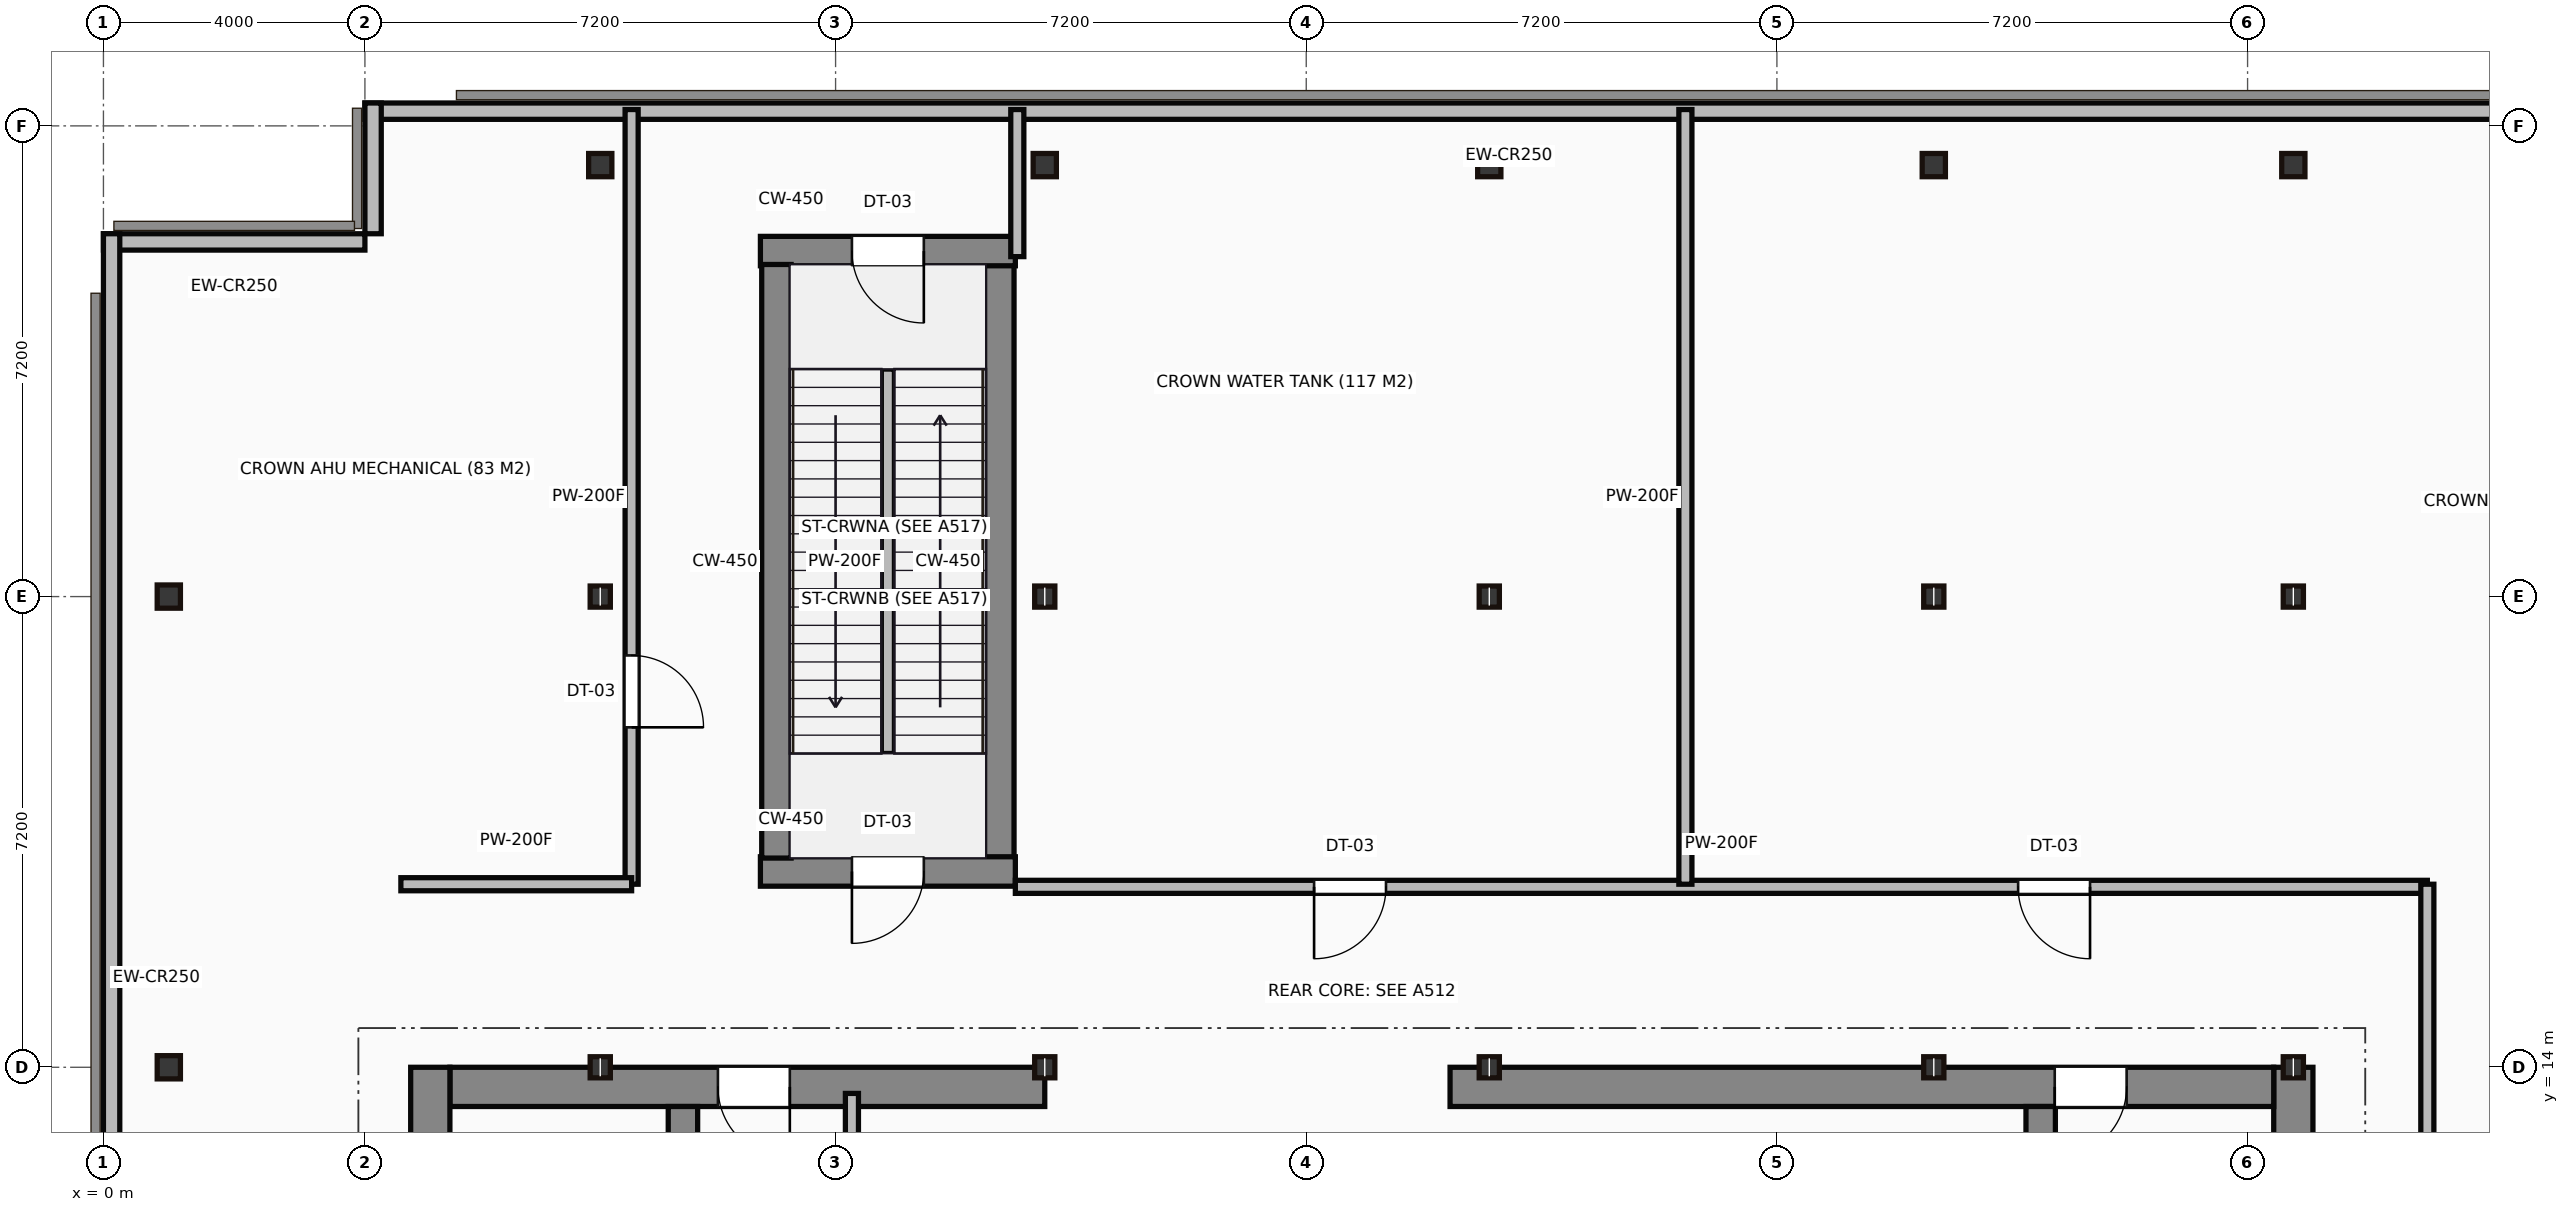
"""IFC4 building model, lengths in metres.
Left out: names, types, materials, properties, quantities, classifications, styles, units other than length and angle.
Written with IfcOpenShell. Run it as: python <this file> out.ifc"""

import sys

from ifc_helpers import new_model, si_unit, direction, frame, frame_2d, origin, origin_2d, place, context, subcontext, project, spatial, rectangle, hollow_rectangle, i_section, extrude, source, transform, mapped, element, fill, save


model = new_model("IFC4")
c1 = context("Model", 3, precision=1e-05, world=origin(), true_north=direction((0.0, 1.0)))
c2 = subcontext(c1, "Body", "Model", "MODEL_VIEW")
j1 = project(units=[si_unit("LENGTHUNIT", "METRE"), si_unit("PLANEANGLEUNIT", "RADIAN")], contexts=[c1])
p1 = place(None, origin())
s1 = spatial("IfcSite", under=j1, at=p1, CompositionType="ELEMENT")
p2 = place(p1, origin())
s2 = spatial("IfcBuilding", under=s1, at=p2, CompositionType="ELEMENT")
p3 = place(p2, frame((0.0, 0.0, 299.85)))
s3 = spatial("IfcBuildingStorey", under=s2, at=p3, CompositionType="ELEMENT", Elevation=299.85)
m1 = source(origin(), c2, "Body", "SweptSolid", [
    extrude(rectangle(XDim=13.1, YDim=0.6, at=frame_2d((6.55, 0.0))), origin(), (0.0, 0.0, 1.0), 3.8),
])
for number, where, z_axis, x_axis in (
    (1, (5.0, 0.9, 0.0), (0.0, 0.0, 1.0), (0.0, 1.0, 0.0)),
    (2, (33.5, 0.9, 0.0), (0.0, 0.0, 1.0), (0.0, 1.0, 0.0)),
):
    element("IfcWall", number, at=place(p3, frame(where, z_axis=z_axis, x_axis=x_axis)), inside=s3, PredefinedType="SHEAR", context=c2, shape_type="MappedRepresentation", body=[
        mapped(m1, transform((0.0, 0.0, 0.0))),
    ])
m2 = source(origin(), c2, "Body", "SweptSolid", [
    extrude(rectangle(XDim=9.1, YDim=0.6, at=frame_2d((4.55, 0.0))), origin(), (0.0, 0.0, 1.0), 3.8),
])
p4 = place(p3, frame((5.3, 13.7, 0.0), z_axis=(0.0, 0.0, 1.0), x_axis=(1.0, 0.0, 0.0)))
e3 = element("IfcWall", 3, at=p4, inside=s3, PredefinedType="SHEAR", context=c2, shape_type="MappedRepresentation", body=[
    mapped(m2, transform((0.0, 0.0, 0.0))),
])
p5 = place(p4, frame((4.1, 0.0, 0.0)))
e4 = element("IfcOpeningElement", 4, at=p5, cuts=e3, PredefinedType="OPENING", context=c2, shape_type="SweptSolid", body=[
    extrude(rectangle(XDim=1.1, YDim=2.15, at=frame_2d((0.55, 1.075))), frame((0.0, 0.31, 0.0), z_axis=(0.0, -1.0, 0.0), x_axis=(1.0, 0.0, 0.0)), (0.0, 0.0, 1.0), 0.62),
])
m3 = source(origin(), c2, "Body", "SweptSolid", [
    extrude(rectangle(XDim=12.6, YDim=0.6, at=frame_2d((6.3, 0.0))), origin(), (0.0, 0.0, 1.0), 3.8),
])
p6 = place(p3, frame((20.6, 13.7, 0.0), z_axis=(0.0, 0.0, 1.0), x_axis=(1.0, 0.0, 0.0)))
e5 = element("IfcWall", 5, at=p6, inside=s3, PredefinedType="SHEAR", context=c2, shape_type="MappedRepresentation", body=[
    mapped(m3, transform((0.0, 0.0, 0.0))),
])
p7 = place(p6, frame((9.25, 0.0, 0.0)))
e6 = element("IfcOpeningElement", 6, at=p7, cuts=e5, PredefinedType="OPENING", context=c2, shape_type="SweptSolid", body=[
    extrude(rectangle(XDim=1.1, YDim=2.15, at=frame_2d((0.55, 1.075))), frame((0.0, 0.31, 0.0), z_axis=(0.0, -1.0, 0.0), x_axis=(1.0, 0.0, 0.0)), (0.0, 0.0, 1.0), 0.62),
])
m4 = source(origin(), c2, "Body", "SweptSolid", [
    extrude(rectangle(XDim=12.5, YDim=0.45, at=frame_2d((6.25, 0.0))), origin(), (0.0, 0.0, 1.0), 3.8),
])
for number, where, z_axis, x_axis in (
    (7, (8.865, 0.9, 0.0), (0.0, 0.0, 1.0), (0.0, 1.0, 0.0)),
    (8, (29.635, 0.9, 0.0), (0.0, 0.0, 1.0), (0.0, 1.0, 0.0)),
):
    element("IfcWall", number, at=place(p3, frame(where, z_axis=z_axis, x_axis=x_axis)), inside=s3, PredefinedType="SHEAR", context=c2, shape_type="MappedRepresentation", body=[
        mapped(m4, transform((0.0, 0.0, 0.0))),
    ])
m5 = source(origin(), c2, "Body", "SweptSolid", [
    extrude(hollow_rectangle(XDim=0.356, YDim=0.356, WallThickness=0.019, at=origin_2d()), origin(), (0.0, 0.0, 1.0), 3.8),
])
for number, where, z_axis, x_axis in (
    (9, (1.0, 14.0, 0.0), (0.0, 0.0, 1.0), (1.0, 0.0, 0.0)),
    (10, (1.0, 21.2, 0.0), (0.0, 0.0, 1.0), (1.0, 0.0, 0.0)),
):
    element("IfcColumn", number, at=place(p3, frame(where, z_axis=z_axis, x_axis=x_axis)), inside=s3, PredefinedType="COLUMN", context=c2, shape_type="MappedRepresentation", body=[
        mapped(m5, transform((0.0, 0.0, 0.0))),
    ])
m6 = source(origin(), c2, "Body", "SweptSolid", [
    extrude(i_section(OverallWidth=0.309, OverallDepth=0.323, WebThickness=0.014, FlangeThickness=0.023, at=origin_2d()), origin(), (0.0, 0.0, 1.0), 3.8),
])
for number, where, z_axis, x_axis in (
    (11, (7.6, 14.0, 0.0), (0.0, 0.0, 1.0), (1.0, 0.0, 0.0)),
    (12, (7.6, 21.2, 0.0), (0.0, 0.0, 1.0), (1.0, 0.0, 0.0)),
):
    element("IfcColumn", number, at=place(p3, frame(where, z_axis=z_axis, x_axis=x_axis)), inside=s3, PredefinedType="COLUMN", context=c2, shape_type="MappedRepresentation", body=[
        mapped(m6, transform((0.0, 0.0, 0.0))),
    ])
p8 = place(p3, frame((7.6, 27.8, 0.0), z_axis=(0.0, 0.0, 1.0), x_axis=(1.0, 0.0, 0.0)))
e13 = element("IfcColumn", 13, at=p8, inside=s3, PredefinedType="COLUMN", context=c2, shape_type="MappedRepresentation", body=[
    mapped(m5, transform((0.0, 0.0, 0.0))),
])
for number, where, z_axis, x_axis in (
    (14, (14.4, 14.0, 0.0), (0.0, 0.0, 1.0), (1.0, 0.0, 0.0)),
    (15, (14.4, 21.2, 0.0), (0.0, 0.0, 1.0), (1.0, 0.0, 0.0)),
):
    element("IfcColumn", number, at=place(p3, frame(where, z_axis=z_axis, x_axis=x_axis)), inside=s3, PredefinedType="COLUMN", context=c2, shape_type="MappedRepresentation", body=[
        mapped(m6, transform((0.0, 0.0, 0.0))),
    ])
p9 = place(p3, frame((14.4, 27.8, 0.0), z_axis=(0.0, 0.0, 1.0), x_axis=(1.0, 0.0, 0.0)))
e16 = element("IfcColumn", 16, at=p9, inside=s3, PredefinedType="COLUMN", context=c2, shape_type="MappedRepresentation", body=[
    mapped(m5, transform((0.0, 0.0, 0.0))),
])
for number, where, z_axis, x_axis in (
    (17, (21.2, 14.0, 0.0), (0.0, 0.0, 1.0), (1.0, 0.0, 0.0)),
    (18, (21.2, 21.2, 0.0), (0.0, 0.0, 1.0), (1.0, 0.0, 0.0)),
):
    element("IfcColumn", number, at=place(p3, frame(where, z_axis=z_axis, x_axis=x_axis)), inside=s3, PredefinedType="COLUMN", context=c2, shape_type="MappedRepresentation", body=[
        mapped(m6, transform((0.0, 0.0, 0.0))),
    ])
p10 = place(p3, frame((21.2, 27.8, 0.0), z_axis=(0.0, 0.0, 1.0), x_axis=(1.0, 0.0, 0.0)))
e19 = element("IfcColumn", 19, at=p10, inside=s3, PredefinedType="COLUMN", context=c2, shape_type="MappedRepresentation", body=[
    mapped(m5, transform((0.0, 0.0, 0.0))),
])
for number, where, z_axis, x_axis in (
    (20, (28.0, 14.0, 0.0), (0.0, 0.0, 1.0), (1.0, 0.0, 0.0)),
    (21, (28.0, 21.2, 0.0), (0.0, 0.0, 1.0), (1.0, 0.0, 0.0)),
):
    element("IfcColumn", number, at=place(p3, frame(where, z_axis=z_axis, x_axis=x_axis)), inside=s3, PredefinedType="COLUMN", context=c2, shape_type="MappedRepresentation", body=[
        mapped(m6, transform((0.0, 0.0, 0.0))),
    ])
p11 = place(p3, frame((28.0, 27.8, 0.0), z_axis=(0.0, 0.0, 1.0), x_axis=(1.0, 0.0, 0.0)))
e22 = element("IfcColumn", 22, at=p11, inside=s3, PredefinedType="COLUMN", context=c2, shape_type="MappedRepresentation", body=[
    mapped(m5, transform((0.0, 0.0, 0.0))),
])
for number, where, z_axis, x_axis in (
    (23, (33.5, 14.0, 0.0), (0.0, 0.0, 1.0), (1.0, 0.0, 0.0)),
    (24, (33.5, 21.2, 0.0), (0.0, 0.0, 1.0), (1.0, 0.0, 0.0)),
):
    element("IfcColumn", number, at=place(p3, frame(where, z_axis=z_axis, x_axis=x_axis)), inside=s3, PredefinedType="COLUMN", context=c2, shape_type="MappedRepresentation", body=[
        mapped(m6, transform((0.0, 0.0, 0.0))),
    ])
p12 = place(p3, frame((33.5, 27.8, 0.0), z_axis=(0.0, 0.0, 1.0), x_axis=(1.0, 0.0, 0.0)))
e25 = element("IfcColumn", 25, at=p12, inside=s3, PredefinedType="COLUMN", context=c2, shape_type="MappedRepresentation", body=[
    mapped(m5, transform((0.0, 0.0, 0.0))),
])
m7 = source(origin(), c2, "Body", "SweptSolid", [
    extrude(rectangle(XDim=35.0, YDim=0.25, at=frame_2d((17.5, 0.0))), origin(), (0.0, 0.0, 1.0), 3.5),
])
p13 = place(p3, frame((39.0, 28.625, 0.0), z_axis=(0.0, 0.0, 1.0), x_axis=(-1.0, 0.0, 0.0)))
e26 = element("IfcWall", 26, at=p13, inside=s3, PredefinedType="STANDARD", context=c2, shape_type="MappedRepresentation", body=[
    mapped(m7, transform((0.0, 0.0, 0.0))),
])
m8 = source(origin(), c2, "Body", "SweptSolid", [
    extrude(rectangle(XDim=2.0, YDim=0.25, at=frame_2d((1.0, 0.0))), origin(), (0.0, 0.0, 1.0), 3.5),
])
p14 = place(p3, frame((4.125, 28.75, 0.0), z_axis=(0.0, 0.0, 1.0), x_axis=(0.0, -1.0, 0.0)))
e27 = element("IfcWall", 27, at=p14, inside=s3, PredefinedType="STANDARD", context=c2, shape_type="MappedRepresentation", body=[
    mapped(m8, transform((0.0, 0.0, 0.0))),
])
m9 = source(origin(), c2, "Body", "SweptSolid", [
    extrude(rectangle(XDim=4.0, YDim=0.25, at=frame_2d((2.0, 0.0))), origin(), (0.0, 0.0, 1.0), 3.5),
])
p15 = place(p3, frame((4.0, 26.625, 0.0), z_axis=(0.0, 0.0, 1.0), x_axis=(-1.0, 0.0, 0.0)))
e28 = element("IfcWall", 28, at=p15, inside=s3, PredefinedType="STANDARD", context=c2, shape_type="MappedRepresentation", body=[
    mapped(m9, transform((0.0, 0.0, 0.0))),
])
m10 = source(origin(), c2, "Body", "SweptSolid", [
    extrude(rectangle(XDim=22.75, YDim=0.25, at=frame_2d((11.375, 0.0))), origin(), (0.0, 0.0, 1.0), 3.5),
])
p16 = place(p3, frame((0.125, 26.75, 0.0), z_axis=(0.0, 0.0, 1.0), x_axis=(0.0, -1.0, 0.0)))
e29 = element("IfcWall", 29, at=p16, inside=s3, PredefinedType="STANDARD", context=c2, shape_type="MappedRepresentation", body=[
    mapped(m10, transform((0.0, 0.0, 0.0))),
])
m11 = source(origin(), c2, "Body", "SweptSolid", [
    extrude(rectangle(XDim=3.9, YDim=0.45, at=frame_2d((1.95, 0.0))), origin(), (0.0, 0.0, 1.0), 3.8),
])
p17 = place(p3, frame((10.05, 16.995, 0.0), z_axis=(0.0, 0.0, 1.0), x_axis=(1.0, 0.0, 0.0)))
e30 = element("IfcWall", 30, at=p17, inside=s3, PredefinedType="SHEAR", context=c2, shape_type="MappedRepresentation", body=[
    mapped(m11, transform((0.0, 0.0, 0.0))),
])
p18 = place(p17, frame((1.4, 0.0, 0.0)))
e31 = element("IfcOpeningElement", 31, at=p18, cuts=e30, PredefinedType="OPENING", context=c2, shape_type="SweptSolid", body=[
    extrude(rectangle(XDim=1.1, YDim=2.15, at=frame_2d((0.55, 1.075))), frame((0.0, 0.235, 0.0), z_axis=(0.0, -1.0, 0.0), x_axis=(1.0, 0.0, 0.0)), (0.0, 0.0, 1.0), 0.47),
])
m12 = source(origin(), c2, "Body", "SweptSolid", [
    extrude(rectangle(XDim=9.08, YDim=0.45, at=frame_2d((4.54, 0.0))), origin(), (0.0, 0.0, 1.0), 3.8),
])
for number, where, z_axis, x_axis in (
    (32, (10.295, 17.2, 0.0), (0.0, 0.0, 1.0), (0.0, 1.0, 0.0)),
    (33, (13.705, 17.2, 0.0), (0.0, 0.0, 1.0), (0.0, 1.0, 0.0)),
):
    element("IfcWall", number, at=place(p3, frame(where, z_axis=z_axis, x_axis=x_axis)), inside=s3, PredefinedType="SHEAR", context=c2, shape_type="MappedRepresentation", body=[
        mapped(m12, transform((0.0, 0.0, 0.0))),
    ])
p19 = place(p3, frame((10.05, 26.485, 0.0), z_axis=(0.0, 0.0, 1.0), x_axis=(1.0, 0.0, 0.0)))
e34 = element("IfcWall", 34, at=p19, inside=s3, PredefinedType="SHEAR", context=c2, shape_type="MappedRepresentation", body=[
    mapped(m11, transform((0.0, 0.0, 0.0))),
])
p20 = place(p19, frame((1.4, 0.0, 0.0)))
e35 = element("IfcOpeningElement", 35, at=p20, cuts=e34, PredefinedType="OPENING", context=c2, shape_type="SweptSolid", body=[
    extrude(rectangle(XDim=1.1, YDim=2.15, at=frame_2d((0.55, 1.075))), frame((0.0, 0.235, 0.0), z_axis=(0.0, -1.0, 0.0), x_axis=(1.0, 0.0, 0.0)), (0.0, 0.0, 1.0), 0.47),
])
m13 = source(origin(), c2, "Body", "SweptSolid", [
    extrude(rectangle(XDim=5.88, YDim=0.2, at=frame_2d((2.94, 0.0))), origin(), (0.0, 0.0, 1.0), 3.08),
])
p21 = place(p3, frame((12.0, 18.8, 0.0), z_axis=(0.0, 0.0, 1.0), x_axis=(0.0, 1.0, 0.0)))
e36 = element("IfcWall", 36, at=p21, inside=s3, PredefinedType="PARTITIONING", context=c2, shape_type="MappedRepresentation", body=[
    mapped(m13, transform((0.0, 0.0, 0.0))),
])
m14 = source(origin(), c2, "Body", "SweptSolid", [
    extrude(rectangle(XDim=3.18, YDim=0.2, at=frame_2d((1.59, 0.0))), origin(), (0.0, 0.0, 1.0), 3.5),
])
p22 = place(p3, frame((11.45, 10.42, 0.0), z_axis=(0.0, 0.0, 1.0), x_axis=(0.0, 1.0, 0.0)))
e37 = element("IfcWall", 37, at=p22, inside=s3, PredefinedType="PARTITIONING", context=c2, shape_type="MappedRepresentation", body=[
    mapped(m14, transform((0.0, 0.0, 0.0))),
])
m15 = source(origin(), c2, "Body", "SweptSolid", [
    extrude(rectangle(XDim=11.85, YDim=0.2, at=frame_2d((5.925, 0.0))), origin(), (0.0, 0.0, 1.0), 3.5),
])
p23 = place(p3, frame((8.08, 16.8, 0.0), z_axis=(0.0, 0.0, 1.0), x_axis=(0.0, 1.0, 0.0)))
e38 = element("IfcWall", 38, at=p23, inside=s3, PredefinedType="PARTITIONING", context=c2, shape_type="MappedRepresentation", body=[
    mapped(m15, transform((0.0, 0.0, 0.0))),
])
p24 = place(p23, frame((2.4, 0.0, 0.0)))
e39 = element("IfcOpeningElement", 39, at=p24, cuts=e38, PredefinedType="OPENING", context=c2, shape_type="SweptSolid", body=[
    extrude(rectangle(XDim=1.1, YDim=2.15, at=frame_2d((0.55, 1.075))), frame((0.0, 0.11, 0.0), z_axis=(0.0, -1.0, 0.0), x_axis=(1.0, 0.0, 0.0)), (0.0, 0.0, 1.0), 0.22),
])
m16 = source(origin(), c2, "Body", "SweptSolid", [
    extrude(rectangle(XDim=3.53, YDim=0.2, at=frame_2d((1.765, 0.0))), origin(), (0.0, 0.0, 1.0), 3.5),
])
p25 = place(p3, frame((4.55, 16.8, 0.0), z_axis=(0.0, 0.0, 1.0), x_axis=(1.0, 0.0, 0.0)))
e40 = element("IfcWall", 40, at=p25, inside=s3, PredefinedType="PARTITIONING", context=c2, shape_type="MappedRepresentation", body=[
    mapped(m16, transform((0.0, 0.0, 0.0))),
])
m17 = source(origin(), c2, "Body", "SweptSolid", [
    extrude(rectangle(XDim=21.6, YDim=0.2, at=frame_2d((10.8, 0.0))), origin(), (0.0, 0.0, 1.0), 3.5),
])
p26 = place(p3, frame((13.95, 16.76, 0.0), z_axis=(0.0, 0.0, 1.0), x_axis=(1.0, 0.0, 0.0)))
e41 = element("IfcWall", 41, at=p26, inside=s3, PredefinedType="PARTITIONING", context=c2, shape_type="MappedRepresentation", body=[
    mapped(m17, transform((0.0, 0.0, 0.0))),
])
p27 = place(p26, frame((4.57, 0.0, 0.0)))
e42 = element("IfcOpeningElement", 42, at=p27, cuts=e41, PredefinedType="OPENING", context=c2, shape_type="SweptSolid", body=[
    extrude(rectangle(XDim=1.1, YDim=2.15, at=frame_2d((0.55, 1.075))), frame((0.0, 0.11, 0.0), z_axis=(0.0, -1.0, 0.0), x_axis=(1.0, 0.0, 0.0)), (0.0, 0.0, 1.0), 0.22),
])
p28 = place(p26, frame((15.34, 0.0, 0.0)))
e43 = element("IfcOpeningElement", 43, at=p28, cuts=e41, PredefinedType="OPENING", context=c2, shape_type="SweptSolid", body=[
    extrude(rectangle(XDim=1.1, YDim=2.15, at=frame_2d((0.55, 1.075))), frame((0.0, 0.11, 0.0), z_axis=(0.0, -1.0, 0.0), x_axis=(1.0, 0.0, 0.0)), (0.0, 0.0, 1.0), 0.22),
])
m18 = source(origin(), c2, "Body", "SweptSolid", [
    extrude(rectangle(XDim=11.25, YDim=0.2, at=frame_2d((5.625, 0.0))), origin(), (0.0, 0.0, 1.0), 3.5),
])
p29 = place(p3, frame((35.55, 5.55, 0.0), z_axis=(0.0, 0.0, 1.0), x_axis=(0.0, 1.0, 0.0)))
e44 = element("IfcWall", 44, at=p29, inside=s3, PredefinedType="PARTITIONING", context=c2, shape_type="MappedRepresentation", body=[
    mapped(m18, transform((0.0, 0.0, 0.0))),
])
m19 = source(origin(), c2, "Body", "SweptSolid", [
    extrude(rectangle(XDim=2.25, YDim=0.2, at=frame_2d((1.125, 0.0))), origin(), (0.0, 0.0, 1.0), 3.5),
])
p30 = place(p3, frame((13.98, 26.4, 0.0), z_axis=(0.0, 0.0, 1.0), x_axis=(0.0, 1.0, 0.0)))
e45 = element("IfcWall", 45, at=p30, inside=s3, PredefinedType="PARTITIONING", context=c2, shape_type="MappedRepresentation", body=[
    mapped(m19, transform((0.0, 0.0, 0.0))),
])
p31 = place(p3, frame((24.2, 16.8, 0.0), z_axis=(0.0, 0.0, 1.0), x_axis=(0.0, 1.0, 0.0)))
e46 = element("IfcWall", 46, at=p31, inside=s3, PredefinedType="PARTITIONING", context=c2, shape_type="MappedRepresentation", body=[
    mapped(m15, transform((0.0, 0.0, 0.0))),
])
m20 = source(origin(), c2, "Body", "SweptSolid", [
    extrude(rectangle(XDim=1.1, YDim=2.15, at=frame_2d((0.55, 1.075))), frame((0.0, 0.025, 0.0), z_axis=(0.0, -1.0, 0.0), x_axis=(1.0, 0.0, 0.0)), (0.0, 0.0, 1.0), 0.05),
])
p32 = place(p5, origin())
e47 = element("IfcDoor", 47, at=p32, inside=s3, OperationType="SINGLE_SWING_RIGHT", PredefinedType="DOOR", context=c2, shape_type="MappedRepresentation", body=[
    mapped(m20, transform((0.0, 0.0, 0.0))),
])
fill(e4, e47)
p33 = place(p7, origin())
e48 = element("IfcDoor", 48, at=p33, inside=s3, OperationType="SINGLE_SWING_LEFT", PredefinedType="DOOR", context=c2, shape_type="MappedRepresentation", body=[
    mapped(m20, transform((0.0, 0.0, 0.0))),
])
fill(e6, e48)
p34 = place(p24, frame((1.1, 0.0, 0.0), z_axis=(0.0, 0.0, 1.0), x_axis=(-1.0, 0.0, 0.0)))
e49 = element("IfcDoor", 49, at=p34, inside=s3, OperationType="SINGLE_SWING_LEFT", PredefinedType="DOOR", context=c2, shape_type="MappedRepresentation", body=[
    mapped(m20, transform((0.0, 0.0, 0.0))),
])
fill(e39, e49)
p35 = place(p27, origin())
e50 = element("IfcDoor", 50, at=p35, inside=s3, OperationType="SINGLE_SWING_LEFT", PredefinedType="DOOR", context=c2, shape_type="MappedRepresentation", body=[
    mapped(m20, transform((0.0, 0.0, 0.0))),
])
fill(e42, e50)
p36 = place(p28, origin())
e51 = element("IfcDoor", 51, at=p36, inside=s3, OperationType="SINGLE_SWING_RIGHT", PredefinedType="DOOR", context=c2, shape_type="MappedRepresentation", body=[
    mapped(m20, transform((0.0, 0.0, 0.0))),
])
fill(e43, e51)
p37 = place(p18, origin())
e52 = element("IfcDoor", 52, at=p37, inside=s3, OperationType="SINGLE_SWING_LEFT", PredefinedType="DOOR", context=c2, shape_type="MappedRepresentation", body=[
    mapped(m20, transform((0.0, 0.0, 0.0))),
])
fill(e31, e52)
p38 = place(p20, frame((1.1, 0.0, 0.0), z_axis=(0.0, 0.0, 1.0), x_axis=(-1.0, 0.0, 0.0)))
e53 = element("IfcDoor", 53, at=p38, inside=s3, OperationType="SINGLE_SWING_RIGHT", PredefinedType="DOOR", context=c2, shape_type="MappedRepresentation", body=[
    mapped(m20, transform((0.0, 0.0, 0.0))),
])
fill(e35, e53)
save(model, sys.argv[1])
